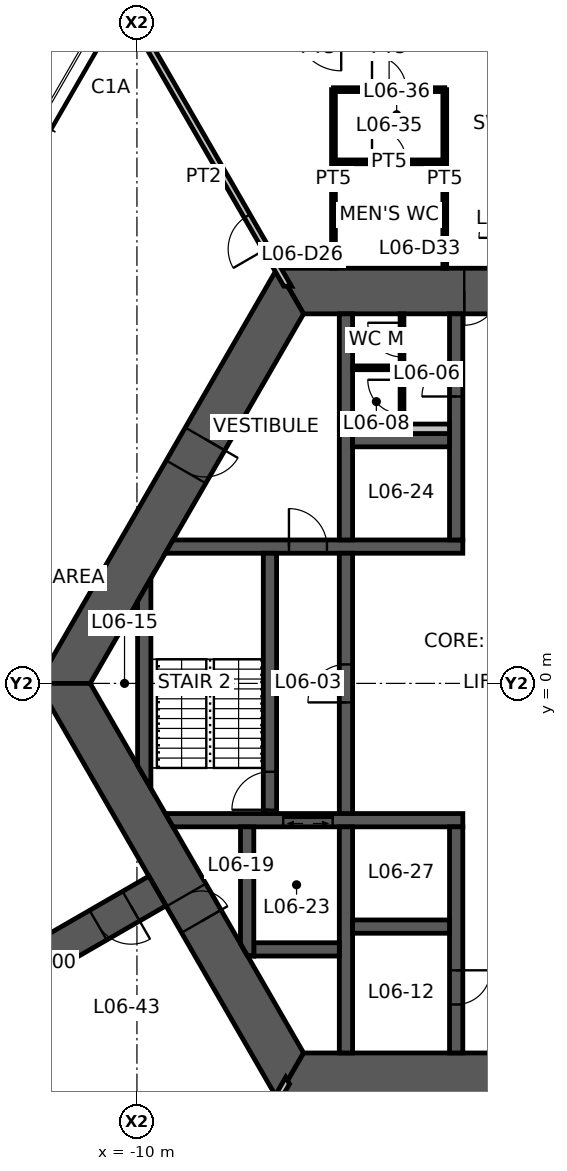
"""IFC4 building model, lengths in metres.
Left out: names, types, materials, properties, quantities, classifications, styles, units other than length and angle.
Written with IfcOpenShell. Run it as: python <this file> out.ifc"""

import sys

from ifc_helpers import new_model, si_unit, direction, frame, frame_2d, origin, place, context, subcontext, project, spatial, polyline, rectangle, outline, extrude, element, fill, save


model = new_model("IFC4")
c1 = context("Model", 3, precision=1e-05, world=origin(), true_north=direction((0.0, 1.0)))
c2 = subcontext(c1, "Body", "Model", "MODEL_VIEW")
j1 = project(units=[si_unit("LENGTHUNIT", "METRE"), si_unit("PLANEANGLEUNIT", "RADIAN")], contexts=[c1])
p1 = place(None, origin())
s1 = spatial("IfcSite", under=j1, at=p1, CompositionType="ELEMENT")
p2 = place(p1, origin())
s2 = spatial("IfcBuilding", under=s1, at=p2, CompositionType="ELEMENT")
p3 = place(p2, frame((0.0, 0.0, 22.6)))
s3 = spatial("IfcBuildingStorey", under=s2, at=p3, CompositionType="ELEMENT", Elevation=22.6)
p4 = place(p3, frame((5.961, 10.325, 0.0), z_axis=(0.0, 0.0, 1.0), x_axis=(-1.0, 0.0, 0.0)))
e1 = element("IfcWall", 1, at=p4, inside=s3, PredefinedType="SHEAR", context=c2, shape_type="SweptSolid", body=[
    extrude(outline(polyline([(-0.346, -0.6), (4.574, -0.6), (5.474, -0.6), (6.449, -0.6), (7.349, -0.6), (12.269, -0.6), (11.576, 0.6), (7.349, 0.6), (6.449, 0.6), (5.474, 0.6), (4.574, 0.6), (0.346, 0.6), (-0.346, -0.6)])), origin(), (0.0, 0.0, 1.0), 4.2),
])
p5 = place(p4, frame((6.449, 0.0, 0.0)))
e2 = element("IfcOpeningElement", 2, at=p5, cuts=e1, PredefinedType="OPENING", context=c2, shape_type="SweptSolid", body=[
    extrude(rectangle(XDim=0.9, YDim=2.1, at=frame_2d((0.45, 1.05))), frame((0.0, 0.61, 0.0), z_axis=(0.0, -1.0, 0.0), x_axis=(1.0, 0.0, 0.0)), (0.0, 0.0, 1.0), 1.22),
])
p6 = place(p4, frame((4.574, 0.0, 0.0)))
e3 = element("IfcOpeningElement", 3, at=p6, cuts=e1, PredefinedType="OPENING", context=c2, shape_type="SweptSolid", body=[
    extrude(rectangle(XDim=0.9, YDim=2.1, at=frame_2d((0.45, 1.05))), frame((0.0, 0.61, 0.0), z_axis=(0.0, -1.0, 0.0), x_axis=(1.0, 0.0, 0.0)), (0.0, 0.0, 1.0), 1.22),
])
p7 = place(p3, frame((-5.961, 10.325, 0.0), z_axis=(0.0, 0.0, 1.0), x_axis=(-0.500004296715, -0.866022923061, 0.0)))
e4 = element("IfcWall", 4, at=p7, inside=s3, PredefinedType="SHEAR", context=c2, shape_type="SweptSolid", body=[
    extrude(outline(polyline([(-0.346, -0.6), (4.494, -0.6), (5.494, -0.6), (12.269, -0.6), (11.576, 0.6), (5.494, 0.6), (4.494, 0.6), (0.346, 0.6), (-0.346, -0.6)])), origin(), (0.0, 0.0, 1.0), 4.2),
])
p8 = place(p7, frame((4.494, 0.0, 0.0)))
e5 = element("IfcOpeningElement", 5, at=p8, cuts=e4, PredefinedType="OPENING", context=c2, shape_type="SweptSolid", body=[
    extrude(rectangle(XDim=1.0, YDim=2.1, at=frame_2d((0.5, 1.05))), frame((0.0, 0.61, 0.0), z_axis=(0.0, -1.0, 0.0), x_axis=(1.0, 0.0, 0.0)), (0.0, 0.0, 1.0), 1.22),
])
p9 = place(p3, frame((-11.922, 0.0, 0.0), z_axis=(0.0, 0.0, 1.0), x_axis=(0.500004296715, -0.866022923061, 0.0)))
e6 = element("IfcWall", 6, at=p9, inside=s3, PredefinedType="SHEAR", context=c2, shape_type="SweptSolid", body=[
    extrude(outline(polyline([(-0.346, -0.6), (6.431, -0.6), (7.231, -0.6), (12.269, -0.6), (11.576, 0.6), (7.231, 0.6), (6.431, 0.6), (0.346, 0.6), (-0.346, -0.6)])), origin(), (0.0, 0.0, 1.0), 4.2),
])
p10 = place(p9, frame((6.431, 0.0, 0.0)))
e7 = element("IfcOpeningElement", 7, at=p10, cuts=e6, PredefinedType="OPENING", context=c2, shape_type="SweptSolid", body=[
    extrude(rectangle(XDim=0.8, YDim=2.1, at=frame_2d((0.4, 1.05))), frame((0.0, 0.61, 0.0), z_axis=(0.0, -1.0, 0.0), x_axis=(1.0, 0.0, 0.0)), (0.0, 0.0, 1.0), 1.22),
])
p11 = place(p3, frame((-5.961, -10.325, 0.0), z_axis=(0.0, 0.0, 1.0), x_axis=(1.0, 0.0, 0.0)))
e8 = element("IfcWall", 8, at=p11, inside=s3, PredefinedType="SHEAR", context=c2, shape_type="SweptSolid", body=[
    extrude(outline(polyline([(-0.346, -0.6), (5.461, -0.6), (6.461, -0.6), (12.269, -0.6), (11.576, 0.6), (6.461, 0.6), (5.461, 0.6), (0.346, 0.6), (-0.346, -0.6)])), origin(), (0.0, 0.0, 1.0), 4.2),
])
p12 = place(p11, frame((5.461, 0.0, 0.0)))
e9 = element("IfcOpeningElement", 9, at=p12, cuts=e8, PredefinedType="OPENING", context=c2, shape_type="SweptSolid", body=[
    extrude(rectangle(XDim=1.0, YDim=2.1, at=frame_2d((0.5, 1.05))), frame((0.0, 0.61, 0.0), z_axis=(0.0, -1.0, 0.0), x_axis=(1.0, 0.0, 0.0)), (0.0, 0.0, 1.0), 1.22),
])
p13 = place(p3, frame((-9.461, -5.462, 0.0), z_axis=(0.0, 0.0, 1.0), x_axis=(-0.866019116917, -0.500010889016, 0.0)))
e10 = element("IfcWall", 10, at=p13, inside=s3, PredefinedType="SHEAR", context=c2, shape_type="SweptSolid", body=[
    extrude(rectangle(XDim=7.595, YDim=0.9, at=frame_2d((3.798, 0.0))), origin(), (0.0, 0.0, 1.0), 4.2),
])
p14 = place(p13, frame((0.8, 0.0, 0.0)))
e11 = element("IfcOpeningElement", 11, at=p14, cuts=e10, PredefinedType="OPENING", context=c2, shape_type="SweptSolid", body=[
    extrude(rectangle(XDim=1.0, YDim=2.1, at=frame_2d((0.5, 1.05))), frame((0.0, 0.46, 0.0), z_axis=(0.0, -1.0, 0.0), x_axis=(1.0, 0.0, 0.0)), (0.0, 0.0, 1.0), 0.92),
])
p15 = place(p3, frame((-9.151, 3.6, 0.0), z_axis=(0.0, 0.0, 1.0), x_axis=(1.0, 0.0, 0.0)))
e12 = element("IfcWall", 12, at=p15, inside=s3, PredefinedType="SHEAR", context=c2, shape_type="SweptSolid", body=[
    extrude(outline(polyline([(-0.101, -0.175), (3.151, -0.175), (4.151, -0.175), (7.726, -0.175), (7.726, 0.175), (4.151, 0.175), (3.151, 0.175), (0.101, 0.175), (-0.101, -0.175)])), origin(), (0.0, 0.0, 1.0), 4.2),
])
p16 = place(p15, frame((3.151, 0.0, 0.0)))
e13 = element("IfcOpeningElement", 13, at=p16, cuts=e12, PredefinedType="OPENING", context=c2, shape_type="SweptSolid", body=[
    extrude(rectangle(XDim=1.0, YDim=2.1, at=frame_2d((0.5, 1.05))), frame((0.0, 0.185, 0.0), z_axis=(0.0, -1.0, 0.0), x_axis=(1.0, 0.0, 0.0)), (0.0, 0.0, 1.0), 0.37),
])
p17 = place(p3, frame((-9.151, -3.6, 0.0), z_axis=(0.0, 0.0, 1.0), x_axis=(1.0, 0.0, 0.0)))
e14 = element("IfcWall", 14, at=p17, inside=s3, PredefinedType="SHEAR", context=c2, shape_type="SweptSolid", body=[
    extrude(outline(polyline([(0.101, -0.175), (3.001, -0.175), (4.301, -0.175), (7.726, -0.175), (7.726, 0.175), (4.301, 0.175), (3.001, 0.175), (-0.101, 0.175), (0.101, -0.175)])), origin(), (0.0, 0.0, 1.0), 4.2),
])
p18 = place(p17, frame((3.001, 0.0, 0.0)))
e15 = element("IfcOpeningElement", 15, at=p18, cuts=e14, PredefinedType="OPENING", context=c2, shape_type="SweptSolid", body=[
    extrude(rectangle(XDim=1.3, YDim=2.1, at=frame_2d((0.65, 1.05))), frame((0.0, 0.185, 0.0), z_axis=(0.0, -1.0, 0.0), x_axis=(1.0, 0.0, 0.0)), (0.0, 0.0, 1.0), 0.37),
])
p19 = place(p3, frame((-1.6, 3.775, 0.0), z_axis=(0.0, 0.0, 1.0), x_axis=(0.0, 1.0, 0.0)))
e16 = element("IfcWall", 16, at=p19, inside=s3, PredefinedType="SHEAR", context=c2, shape_type="SweptSolid", body=[
    extrude(rectangle(XDim=5.95, YDim=0.35, at=frame_2d((2.975, 0.0))), origin(), (0.0, 0.0, 1.0), 4.2),
])
p20 = place(p19, frame((3.775, 0.0, 0.0)))
e17 = element("IfcOpeningElement", 17, at=p20, cuts=e16, PredefinedType="OPENING", context=c2, shape_type="SweptSolid", body=[
    extrude(rectangle(XDim=0.9, YDim=2.1, at=frame_2d((0.45, 1.05))), frame((0.0, 0.185, 0.0), z_axis=(0.0, -1.0, 0.0), x_axis=(1.0, 0.0, 0.0)), (0.0, 0.0, 1.0), 0.37),
])
p21 = place(p3, frame((-1.6, -3.775, 0.0), z_axis=(0.0, 0.0, 1.0), x_axis=(0.0, -1.0, 0.0)))
e18 = element("IfcWall", 18, at=p21, inside=s3, PredefinedType="SHEAR", context=c2, shape_type="SweptSolid", body=[
    extrude(rectangle(XDim=5.95, YDim=0.35, at=frame_2d((2.975, 0.0))), origin(), (0.0, 0.0, 1.0), 4.2),
])
p22 = place(p21, frame((3.775, 0.0, 0.0)))
e19 = element("IfcOpeningElement", 19, at=p22, cuts=e18, PredefinedType="OPENING", context=c2, shape_type="SweptSolid", body=[
    extrude(rectangle(XDim=0.9, YDim=2.1, at=frame_2d((0.45, 1.05))), frame((0.0, 0.185, 0.0), z_axis=(0.0, -1.0, 0.0), x_axis=(1.0, 0.0, 0.0)), (0.0, 0.0, 1.0), 0.37),
])
p23 = place(p3, frame((-4.5, -3.425, 0.0), z_axis=(0.0, 0.0, 1.0), x_axis=(0.0, 1.0, 0.0)))
e20 = element("IfcWall", 20, at=p23, inside=s3, PredefinedType="SHEAR", context=c2, shape_type="SweptSolid", body=[
    extrude(rectangle(XDim=6.85, YDim=0.35, at=frame_2d((3.425, 0.0))), origin(), (0.0, 0.0, 1.0), 4.2),
])
p24 = place(p23, frame((2.925, 0.0, 0.0)))
e21 = element("IfcOpeningElement", 21, at=p24, cuts=e20, PredefinedType="OPENING", context=c2, shape_type="SweptSolid", body=[
    extrude(rectangle(XDim=1.0, YDim=2.1, at=frame_2d((0.5, 1.05))), frame((0.0, 0.185, 0.0), z_axis=(0.0, -1.0, 0.0), x_axis=(1.0, 0.0, 0.0)), (0.0, 0.0, 1.0), 0.37),
])
p25 = place(p3, frame((-6.5, -3.425, 0.0), z_axis=(0.0, 0.0, 1.0), x_axis=(0.0, 1.0, 0.0)))
e22 = element("IfcWall", 22, at=p25, inside=s3, PredefinedType="SHEAR", context=c2, shape_type="SweptSolid", body=[
    extrude(rectangle(XDim=6.85, YDim=0.35, at=frame_2d((3.425, 0.0))), origin(), (0.0, 0.0, 1.0), 4.2),
])
p26 = place(p25, frame((0.1, 0.0, 0.0)))
e23 = element("IfcOpeningElement", 23, at=p26, cuts=e22, PredefinedType="OPENING", context=c2, shape_type="SweptSolid", body=[
    extrude(rectangle(XDim=1.0, YDim=2.1, at=frame_2d((0.5, 1.05))), frame((0.0, 0.185, 0.0), z_axis=(0.0, -1.0, 0.0), x_axis=(1.0, 0.0, 0.0)), (0.0, 0.0, 1.0), 0.37),
])
for number, where, z_axis, x_axis in (
    (24, (-4.5, 3.775, 0.0), (0.0, 0.0, 1.0), (0.0, 1.0, 0.0)),
    (25, (-4.5, -3.775, 0.0), (0.0, 0.0, 1.0), (0.0, -1.0, 0.0)),
):
    element("IfcWall", number, at=place(p3, frame(where, z_axis=z_axis, x_axis=x_axis)), inside=s3, PredefinedType="SHEAR", context=c2, shape_type="SweptSolid", body=[
        extrude(rectangle(XDim=5.95, YDim=0.35, at=frame_2d((2.975, 0.0))), origin(), (0.0, 0.0, 1.0), 4.2),
    ])
for number, where, z_axis, x_axis in (
    (26, (-4.325, 6.4, 0.0), (0.0, 0.0, 1.0), (1.0, 0.0, 0.0)),
    (27, (-4.325, -6.4, 0.0), (0.0, 0.0, 1.0), (1.0, 0.0, 0.0)),
):
    element("IfcWall", number, at=place(p3, frame(where, z_axis=z_axis, x_axis=x_axis)), inside=s3, PredefinedType="SHEAR", context=c2, shape_type="SweptSolid", body=[
        extrude(rectangle(XDim=2.55, YDim=0.35, at=frame_2d((1.275, 0.0))), origin(), (0.0, 0.0, 1.0), 4.2),
    ])
p27 = place(p3, frame((-6.925, -7.0, 0.0), z_axis=(0.0, 0.0, 1.0), x_axis=(1.0, 0.0, 0.0)))
e28 = element("IfcWall", 28, at=p27, inside=s3, PredefinedType="SHEAR", context=c2, shape_type="SweptSolid", body=[
    extrude(rectangle(XDim=2.25, YDim=0.35, at=frame_2d((1.125, 0.0))), origin(), (0.0, 0.0, 1.0), 4.2),
])
p28 = place(p3, frame((-7.1, -3.775, 0.0), z_axis=(0.0, 0.0, 1.0), x_axis=(0.0, -1.0, 0.0)))
e29 = element("IfcWall", 29, at=p28, inside=s3, PredefinedType="SHEAR", context=c2, shape_type="SweptSolid", body=[
    extrude(outline(polyline([(0.0, -0.175), (3.074, -0.175), (3.377, 0.0), (3.4, 0.175), (0.0, 0.175), (0.0, -0.175)])), origin(), (0.0, 0.0, 1.0), 4.2),
])
p29 = place(p3, frame((-9.808, -2.462, 0.0), z_axis=(0.0, 0.0, 1.0), x_axis=(0.0, 1.0, 0.0)))
e30 = element("IfcWall", 30, at=p29, inside=s3, PredefinedType="SHEAR", context=c2, shape_type="SweptSolid", body=[
    extrude(outline(polyline([(-0.303, -0.175), (5.228, -0.175), (4.621, 0.175), (0.303, 0.175), (-0.303, -0.175)])), origin(), (0.0, 0.0, 1.0), 4.2),
])
p30 = place(p3, frame((-4.325, 6.7, 0.0), z_axis=(0.0, 0.0, 1.0), x_axis=(1.0, 0.0, 0.0)))
e31 = element("IfcWall", 31, at=p30, inside=s3, PredefinedType="PLUMBINGWALL", context=c2, shape_type="SweptSolid", body=[
    extrude(rectangle(XDim=2.55, YDim=0.25, at=frame_2d((1.275, 0.0))), origin(), (0.0, 0.0, 1.0), 4.2),
])
p31 = place(p3, frame((-3.025, 6.575, 0.0), z_axis=(0.0, 0.0, 1.0), x_axis=(0.0, 1.0, 0.0)))
e32 = element("IfcWall", 32, at=p31, inside=s3, PredefinedType="PARTITIONING", context=c2, shape_type="SweptSolid", body=[
    extrude(rectangle(XDim=3.15, YDim=0.1, at=frame_2d((1.575, 0.0))), origin(), (0.0, 0.0, 1.0), 3.2),
])
p32 = place(p31, frame((2.015, 0.0, 0.0)))
e33 = element("IfcOpeningElement", 33, at=p32, cuts=e32, PredefinedType="OPENING", context=c2, shape_type="SweptSolid", body=[
    extrude(rectangle(XDim=0.9, YDim=2.1, at=frame_2d((0.45, 1.05))), frame((0.0, 0.06, 0.0), z_axis=(0.0, -1.0, 0.0), x_axis=(1.0, 0.0, 0.0)), (0.0, 0.0, 1.0), 0.12),
])
p33 = place(p31, frame((0.515, 0.0, 0.0)))
e34 = element("IfcOpeningElement", 34, at=p33, cuts=e32, PredefinedType="OPENING", context=c2, shape_type="SweptSolid", body=[
    extrude(rectangle(XDim=0.9, YDim=2.1, at=frame_2d((0.45, 1.05))), frame((0.0, 0.06, 0.0), z_axis=(0.0, -1.0, 0.0), x_axis=(1.0, 0.0, 0.0)), (0.0, 0.0, 1.0), 0.12),
])
p34 = place(p3, frame((-3.075, 8.305, 0.0), z_axis=(0.0, 0.0, 1.0), x_axis=(-1.0, 0.0, 0.0)))
e35 = element("IfcWall", 35, at=p34, inside=s3, PredefinedType="PARTITIONING", context=c2, shape_type="SweptSolid", body=[
    extrude(rectangle(XDim=1.25, YDim=0.1, at=frame_2d((0.625, 0.0))), origin(), (0.0, 0.0, 1.0), 3.2),
])
p35 = place(p3, frame((-6.035, 10.453, 0.0), z_axis=(0.0, 0.0, 1.0), x_axis=(-0.499993402427, 0.866029212861, 0.0)))
e36 = element("IfcWall", 36, at=p35, inside=s3, PredefinedType="PARTITIONING", context=c2, shape_type="SweptSolid", body=[
    extrude(outline(polyline([(-0.051, -0.087), (1.129, -0.087), (2.129, -0.087), (7.93, -0.087), (7.93, 0.087), (2.129, 0.087), (1.129, 0.087), (0.051, 0.087), (-0.051, -0.087)])), origin(), (0.0, 0.0, 1.0), 3.3),
])
p36 = place(p35, frame((1.129, 0.0, 0.0)))
e37 = element("IfcOpeningElement", 37, at=p36, cuts=e36, PredefinedType="OPENING", context=c2, shape_type="SweptSolid", body=[
    extrude(rectangle(XDim=1.0, YDim=2.1, at=frame_2d((0.5, 1.05))), frame((0.0, 0.098, 0.0), z_axis=(0.0, -1.0, 0.0), x_axis=(1.0, 0.0, 0.0)), (0.0, 0.0, 1.0), 0.195),
])
p37 = place(p3, frame((-6.035, -10.453, 0.0), z_axis=(0.0, 0.0, 1.0), x_axis=(-0.499993402427, -0.866029212861, 0.0)))
e38 = element("IfcWall", 38, at=p37, inside=s3, PredefinedType="PARTITIONING", context=c2, shape_type="SweptSolid", body=[
    extrude(outline(polyline([(-0.051, -0.087), (1.129, -0.087), (2.129, -0.087), (7.93, -0.087), (7.93, 0.087), (2.129, 0.087), (1.129, 0.087), (0.051, 0.087), (-0.051, -0.087)])), origin(), (0.0, 0.0, 1.0), 3.3),
])
p38 = place(p37, frame((1.129, 0.0, 0.0)))
e39 = element("IfcOpeningElement", 39, at=p38, cuts=e38, PredefinedType="OPENING", context=c2, shape_type="SweptSolid", body=[
    extrude(rectangle(XDim=1.0, YDim=2.1, at=frame_2d((0.5, 1.05))), frame((0.0, 0.098, 0.0), z_axis=(0.0, -1.0, 0.0), x_axis=(1.0, 0.0, 0.0)), (0.0, 0.0, 1.0), 0.195),
])
p39 = place(p3, frame((-4.829, 13.725, 0.0), z_axis=(0.0, 0.0, 1.0), x_axis=(1.0, 0.0, 0.0)))
e40 = element("IfcWall", 40, at=p39, inside=s3, PredefinedType="PARTITIONING", context=c2, shape_type="SweptSolid", body=[
    extrude(rectangle(XDim=2.929, YDim=0.1, at=frame_2d((1.464, 0.0))), origin(), (0.0, 0.0, 1.0), 3.2),
])
p40 = place(p39, frame((1.014, 0.0, 0.0)))
e41 = element("IfcOpeningElement", 41, at=p40, cuts=e40, PredefinedType="OPENING", context=c2, shape_type="SweptSolid", body=[
    extrude(rectangle(XDim=0.9, YDim=2.1, at=frame_2d((0.45, 1.05))), frame((0.0, 0.06, 0.0), z_axis=(0.0, -1.0, 0.0), x_axis=(1.0, 0.0, 0.0)), (0.0, 0.0, 1.0), 0.12),
])
p41 = place(p3, frame((-4.829, 15.625, 0.0), z_axis=(0.0, 0.0, 1.0), x_axis=(1.0, 0.0, 0.0)))
e42 = element("IfcWall", 42, at=p41, inside=s3, PredefinedType="PARTITIONING", context=c2, shape_type="SweptSolid", body=[
    extrude(rectangle(XDim=2.929, YDim=0.1, at=frame_2d((1.464, 0.0))), origin(), (0.0, 0.0, 1.0), 3.2),
])
p42 = place(p41, frame((1.014, 0.0, 0.0)))
e43 = element("IfcOpeningElement", 43, at=p42, cuts=e42, PredefinedType="OPENING", context=c2, shape_type="SweptSolid", body=[
    extrude(rectangle(XDim=0.9, YDim=2.1, at=frame_2d((0.45, 1.05))), frame((0.0, 0.06, 0.0), z_axis=(0.0, -1.0, 0.0), x_axis=(1.0, 0.0, 0.0)), (0.0, 0.0, 1.0), 0.12),
])
for number, where, z_axis, x_axis in (
    (44, (-1.9, 10.925, 0.0), (0.0, 0.0, 1.0), (0.0, 1.0, 0.0)),
    (45, (-4.829, 10.925, 0.0), (0.0, 0.0, 1.0), (0.0, 1.0, 0.0)),
):
    element("IfcWall", number, at=place(p3, frame(where, z_axis=z_axis, x_axis=x_axis)), inside=s3, PredefinedType="PARTITIONING", context=c2, shape_type="SweptSolid", body=[
        extrude(rectangle(XDim=4.7, YDim=0.1, at=frame_2d((2.35, 0.0))), origin(), (0.0, 0.0, 1.0), 3.2),
    ])
p43 = place(p3, frame((-14.775, -9.05, 0.0), z_axis=(0.0, 0.0, 1.0), x_axis=(0.499993908199, -0.866028920859, 0.0)))
e46 = element("IfcWall", 46, at=p43, inside=s3, PredefinedType="PARTITIONING", context=c2, shape_type="SweptSolid", body=[
    extrude(rectangle(XDim=9.55, YDim=0.175, at=frame_2d((4.775, 0.0))), origin(), (0.0, 0.0, 1.0), 3.208),
])
p44 = place(p43, frame((4.175, 0.0, 0.0)))
e47 = element("IfcOpeningElement", 47, at=p44, cuts=e46, PredefinedType="OPENING", context=c2, shape_type="SweptSolid", body=[
    extrude(rectangle(XDim=1.2, YDim=2.1, at=frame_2d((0.6, 1.05))), frame((0.0, 0.098, 0.0), z_axis=(0.0, -1.0, 0.0), x_axis=(1.0, 0.0, 0.0)), (0.0, 0.0, 1.0), 0.195),
])
p45 = place(p5, origin())
e48 = element("IfcDoor", 48, at=p45, inside=s3, OperationType="SINGLE_SWING_RIGHT", PredefinedType="DOOR", context=c2, shape_type="SweptSolid", body=[
    extrude(rectangle(XDim=0.9, YDim=2.1, at=frame_2d((0.45, 1.05))), frame((0.0, 0.025, 0.0), z_axis=(0.0, -1.0, 0.0), x_axis=(1.0, 0.0, 0.0)), (0.0, 0.0, 1.0), 0.05),
])
fill(e2, e48)
p46 = place(p10, origin())
e49 = element("IfcDoor", 49, at=p46, inside=s3, OperationType="SINGLE_SWING_RIGHT", PredefinedType="DOOR", context=c2, shape_type="SweptSolid", body=[
    extrude(rectangle(XDim=0.8, YDim=2.1, at=frame_2d((0.4, 1.05))), frame((0.0, 0.025, 0.0), z_axis=(0.0, -1.0, 0.0), x_axis=(1.0, 0.0, 0.0)), (0.0, 0.0, 1.0), 0.05),
])
fill(e7, e49)
p47 = place(p8, origin())
e50 = element("IfcDoor", 50, at=p47, inside=s3, OperationType="SINGLE_SWING_LEFT", PredefinedType="DOOR", context=c2, shape_type="SweptSolid", body=[
    extrude(rectangle(XDim=1.0, YDim=2.1, at=frame_2d((0.5, 1.05))), frame((0.0, 0.025, 0.0), z_axis=(0.0, -1.0, 0.0), x_axis=(1.0, 0.0, 0.0)), (0.0, 0.0, 1.0), 0.05),
])
fill(e5, e50)
p48 = place(p24, origin())
e51 = element("IfcDoor", 51, at=p48, inside=s3, OperationType="SINGLE_SWING_LEFT", PredefinedType="DOOR", context=c2, shape_type="SweptSolid", body=[
    extrude(rectangle(XDim=1.0, YDim=2.1, at=frame_2d((0.5, 1.05))), frame((0.0, 0.025, 0.0), z_axis=(0.0, -1.0, 0.0), x_axis=(1.0, 0.0, 0.0)), (0.0, 0.0, 1.0), 0.05),
])
fill(e21, e51)
p49 = place(p26, origin())
e52 = element("IfcDoor", 52, at=p49, inside=s3, OperationType="SINGLE_SWING_LEFT", PredefinedType="DOOR", context=c2, shape_type="SweptSolid", body=[
    extrude(rectangle(XDim=1.0, YDim=2.1, at=frame_2d((0.5, 1.05))), frame((0.0, 0.025, 0.0), z_axis=(0.0, -1.0, 0.0), x_axis=(1.0, 0.0, 0.0)), (0.0, 0.0, 1.0), 0.05),
])
fill(e23, e52)
p50 = place(p16, origin())
e53 = element("IfcDoor", 53, at=p50, inside=s3, OperationType="SINGLE_SWING_LEFT", PredefinedType="DOOR", context=c2, shape_type="SweptSolid", body=[
    extrude(rectangle(XDim=1.0, YDim=2.1, at=frame_2d((0.5, 1.05))), frame((0.0, 0.025, 0.0), z_axis=(0.0, -1.0, 0.0), x_axis=(1.0, 0.0, 0.0)), (0.0, 0.0, 1.0), 0.05),
])
fill(e13, e53)
p51 = place(p20, origin())
e54 = element("IfcDoor", 54, at=p51, inside=s3, OperationType="SINGLE_SWING_LEFT", PredefinedType="DOOR", context=c2, shape_type="SweptSolid", body=[
    extrude(rectangle(XDim=0.9, YDim=2.1, at=frame_2d((0.45, 1.05))), frame((0.0, 0.025, 0.0), z_axis=(0.0, -1.0, 0.0), x_axis=(1.0, 0.0, 0.0)), (0.0, 0.0, 1.0), 0.05),
])
fill(e17, e54)
p52 = place(p22, origin())
e55 = element("IfcDoor", 55, at=p52, inside=s3, OperationType="SINGLE_SWING_LEFT", PredefinedType="DOOR", context=c2, shape_type="SweptSolid", body=[
    extrude(rectangle(XDim=0.9, YDim=2.1, at=frame_2d((0.45, 1.05))), frame((0.0, 0.025, 0.0), z_axis=(0.0, -1.0, 0.0), x_axis=(1.0, 0.0, 0.0)), (0.0, 0.0, 1.0), 0.05),
])
fill(e19, e55)
p53 = place(p14, origin())
e56 = element("IfcDoor", 56, at=p53, inside=s3, OperationType="SINGLE_SWING_LEFT", PredefinedType="DOOR", context=c2, shape_type="SweptSolid", body=[
    extrude(rectangle(XDim=1.0, YDim=2.1, at=frame_2d((0.5, 1.05))), frame((0.0, 0.025, 0.0), z_axis=(0.0, -1.0, 0.0), x_axis=(1.0, 0.0, 0.0)), (0.0, 0.0, 1.0), 0.05),
])
fill(e11, e56)
p54 = place(p32, origin())
e57 = element("IfcDoor", 57, at=p54, inside=s3, OperationType="SINGLE_SWING_RIGHT", PredefinedType="DOOR", context=c2, shape_type="SweptSolid", body=[
    extrude(rectangle(XDim=0.9, YDim=2.1, at=frame_2d((0.45, 1.05))), frame((0.0, 0.025, 0.0), z_axis=(0.0, -1.0, 0.0), x_axis=(1.0, 0.0, 0.0)), (0.0, 0.0, 1.0), 0.05),
])
fill(e33, e57)
p55 = place(p33, origin())
e58 = element("IfcDoor", 58, at=p55, inside=s3, OperationType="SINGLE_SWING_RIGHT", PredefinedType="DOOR", context=c2, shape_type="SweptSolid", body=[
    extrude(rectangle(XDim=0.9, YDim=2.1, at=frame_2d((0.45, 1.05))), frame((0.0, 0.025, 0.0), z_axis=(0.0, -1.0, 0.0), x_axis=(1.0, 0.0, 0.0)), (0.0, 0.0, 1.0), 0.05),
])
fill(e34, e58)
p56 = place(p36, origin())
e59 = element("IfcDoor", 59, at=p56, inside=s3, OperationType="SINGLE_SWING_LEFT", PredefinedType="DOOR", context=c2, shape_type="SweptSolid", body=[
    extrude(rectangle(XDim=1.0, YDim=2.1, at=frame_2d((0.5, 1.05))), frame((0.0, 0.025, 0.0), z_axis=(0.0, -1.0, 0.0), x_axis=(1.0, 0.0, 0.0)), (0.0, 0.0, 1.0), 0.05),
])
fill(e37, e59)
p57 = place(p40, origin())
e60 = element("IfcDoor", 60, at=p57, inside=s3, OperationType="SINGLE_SWING_LEFT", PredefinedType="DOOR", context=c2, shape_type="SweptSolid", body=[
    extrude(rectangle(XDim=0.9, YDim=2.1, at=frame_2d((0.45, 1.05))), frame((0.0, 0.025, 0.0), z_axis=(0.0, -1.0, 0.0), x_axis=(1.0, 0.0, 0.0)), (0.0, 0.0, 1.0), 0.05),
])
fill(e41, e60)
p58 = place(p42, origin())
e61 = element("IfcDoor", 61, at=p58, inside=s3, OperationType="SINGLE_SWING_LEFT", PredefinedType="DOOR", context=c2, shape_type="SweptSolid", body=[
    extrude(rectangle(XDim=0.9, YDim=2.1, at=frame_2d((0.45, 1.05))), frame((0.0, 0.025, 0.0), z_axis=(0.0, -1.0, 0.0), x_axis=(1.0, 0.0, 0.0)), (0.0, 0.0, 1.0), 0.05),
])
fill(e43, e61)
p59 = place(p18, origin())
e62 = element("IfcDoor", 62, at=p59, inside=s3, OperationType="DOUBLE_DOOR_SLIDING", PredefinedType="DOOR", context=c2, shape_type="SweptSolid", body=[
    extrude(rectangle(XDim=1.3, YDim=2.1, at=frame_2d((0.65, 1.05))), frame((0.0, 0.025, 0.0), z_axis=(0.0, -1.0, 0.0), x_axis=(1.0, 0.0, 0.0)), (0.0, 0.0, 1.0), 0.05),
])
fill(e15, e62)
save(model, sys.argv[1])
